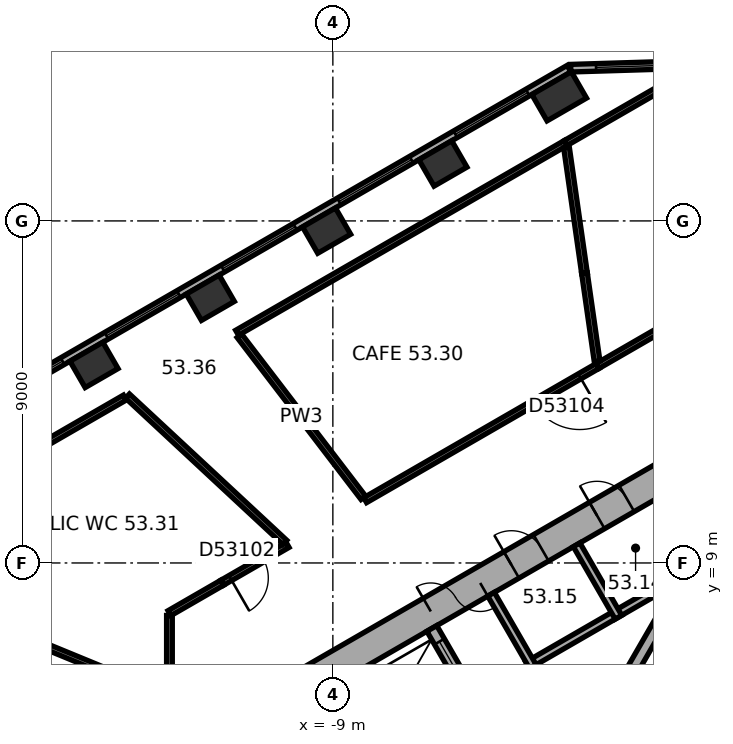
"""IFC4 building model, lengths in metres.
Left out: names, types, materials, properties, quantities, classifications, styles, units other than length and angle.
Written with IfcOpenShell. Run it as: python <this file> out.ifc"""

import sys

from ifc_helpers import new_model, si_unit, direction, frame, frame_2d, origin, origin_2d, place, context, subcontext, project, spatial, rectangle, extrude, element, fill, save


model = new_model("IFC4")
c1 = context("Model", 3, precision=1e-05, world=origin(), true_north=direction((0.0, 1.0)))
c2 = subcontext(c1, "Body", "Model", "MODEL_VIEW")
j1 = project(units=[si_unit("LENGTHUNIT", "METRE"), si_unit("PLANEANGLEUNIT", "RADIAN")], contexts=[c1])
p1 = place(None, origin())
s1 = spatial("IfcSite", under=j1, at=p1, CompositionType="ELEMENT")
p2 = place(p1, origin())
s2 = spatial("IfcBuilding", under=s1, at=p2, CompositionType="ELEMENT")
p3 = place(p2, frame((0.0, 0.0, 214.3)))
s3 = spatial("IfcBuildingStorey", under=s2, at=p3, CompositionType="ELEMENT", Elevation=214.3)
p4 = place(p3, frame((-3.044, 21.279, 0.0), z_axis=(0.0, 0.0, 1.0), x_axis=(-0.866025403784, -0.5, 0.0)))
e1 = element("IfcColumn", 1, at=p4, inside=s3, PredefinedType="COLUMN", context=c2, shape_type="SweptSolid", body=[
    extrude(rectangle(XDim=1.2, YDim=0.8, at=origin_2d()), origin(), (0.0, 0.0, 1.0), 7.4),
])
for number, where, z_axis, x_axis in (
    (2, (-6.104, 19.512, 0.0), (0.0, 0.0, 1.0), (-0.866, -0.5, 0.0)),
    (3, (-9.165, 17.745, 0.0), (0.0, 0.0, 1.0), (-0.866, -0.5, 0.0)),
    (4, (-12.225, 15.978, 0.0), (0.0, 0.0, 1.0), (-0.866, -0.5, 0.0)),
    (5, (-15.285, 14.211, 0.0), (0.0, 0.0, 1.0), (-0.866, -0.5, 0.0)),
):
    element("IfcColumn", number, at=place(p3, frame(where, z_axis=z_axis, x_axis=x_axis)), inside=s3, PredefinedType="COLUMN", context=c2, shape_type="SweptSolid", body=[
        extrude(rectangle(XDim=1.0, YDim=0.8, at=origin_2d()), origin(), (0.0, 0.0, 1.0), 7.4),
    ])
p5 = place(p3, frame((0.2, 11.547, 0.0), z_axis=(0.0, 0.0, 1.0), x_axis=(-0.866023897231, -0.500002609418, 0.0)))
e6 = element("IfcWall", 6, at=p5, inside=s3, PredefinedType="SHEAR", context=c2, shape_type="SweptSolid", body=[
    extrude(rectangle(XDim=11.894, YDim=0.8, at=frame_2d((5.947, 0.0))), origin(), (0.0, 0.0, 1.0), 7.4),
])
p6 = place(p5, frame((6.147, 0.0, 0.0)))
e7 = element("IfcOpeningElement", 7, at=p6, cuts=e6, PredefinedType="OPENING", context=c2, shape_type="SweptSolid", body=[
    extrude(rectangle(XDim=1.5, YDim=2.1, at=frame_2d((0.75, 1.05))), frame((0.0, 0.41, 0.0), z_axis=(0.0, -1.0, 0.0), x_axis=(1.0, 0.0, 0.0)), (0.0, 0.0, 1.0), 0.82),
])
p7 = place(p5, frame((1.697, 0.0, 0.0)))
e8 = element("IfcOpeningElement", 8, at=p7, cuts=e6, PredefinedType="OPENING", context=c2, shape_type="SweptSolid", body=[
    extrude(rectangle(XDim=0.9, YDim=2.1, at=frame_2d((0.45, 1.05))), frame((0.0, 0.41, 0.0), z_axis=(0.0, -1.0, 0.0), x_axis=(1.0, 0.0, 0.0)), (0.0, 0.0, 1.0), 0.82),
])
p8 = place(p5, frame((4.297, 0.0, 0.0)))
e9 = element("IfcOpeningElement", 9, at=p8, cuts=e6, PredefinedType="OPENING", context=c2, shape_type="SweptSolid", body=[
    extrude(rectangle(XDim=0.9, YDim=2.1, at=frame_2d((0.45, 1.05))), frame((0.0, 0.41, 0.0), z_axis=(0.0, -1.0, 0.0), x_axis=(1.0, 0.0, 0.0)), (0.0, 0.0, 1.0), 0.82),
])
p9 = place(p3, frame((1.389, 22.145, 0.0), z_axis=(0.0, 0.0, 1.0), x_axis=(-0.999534702881, -0.030502093955, 0.0)))
e10 = element("IfcWall", 10, at=p9, inside=s3, PredefinedType="STANDARD", context=c2, shape_type="SweptSolid", body=[
    extrude(rectangle(XDim=4.13, YDim=0.2, at=frame_2d((2.065, 0.0))), origin(), (0.0, 0.0, 1.0), 7.4),
])
p10 = place(p9, frame((0.665, 0.0, 0.8)))
e11 = element("IfcOpeningElement", 11, at=p10, cuts=e10, PredefinedType="OPENING", context=c2, shape_type="SweptSolid", body=[
    extrude(rectangle(XDim=2.8, YDim=4.2, at=frame_2d((1.4, 2.1))), frame((0.0, 0.11, 0.0), z_axis=(0.0, -1.0, 0.0), x_axis=(1.0, 0.0, 0.0)), (0.0, 0.0, 1.0), 0.22),
])
p11 = place(p3, frame((-2.786, 22.005, 0.0), z_axis=(0.0, 0.0, 1.0), x_axis=(-0.866026555358, -0.49999800541, 0.0)))
e12 = element("IfcWall", 12, at=p11, inside=s3, PredefinedType="STANDARD", context=c2, shape_type="SweptSolid", body=[
    extrude(rectangle(XDim=18.841, YDim=0.2, at=frame_2d((9.421, 0.0))), origin(), (0.0, 0.0, 1.0), 7.4),
])
p12 = place(p11, frame((1.254, 0.0, 0.8)))
e13 = element("IfcOpeningElement", 13, at=p12, cuts=e12, PredefinedType="OPENING", context=c2, shape_type="SweptSolid", body=[
    extrude(rectangle(XDim=2.2, YDim=4.2, at=frame_2d((1.1, 2.1))), frame((0.0, 0.11, 0.0), z_axis=(0.0, -1.0, 0.0), x_axis=(1.0, 0.0, 0.0)), (0.0, 0.0, 1.0), 0.22),
])
p13 = place(p11, frame((4.788, 0.0, 0.8)))
e14 = element("IfcOpeningElement", 14, at=p13, cuts=e12, PredefinedType="OPENING", context=c2, shape_type="SweptSolid", body=[
    extrude(rectangle(XDim=2.2, YDim=4.2, at=frame_2d((1.1, 2.1))), frame((0.0, 0.11, 0.0), z_axis=(0.0, -1.0, 0.0), x_axis=(1.0, 0.0, 0.0)), (0.0, 0.0, 1.0), 0.22),
])
p14 = place(p11, frame((8.321, 0.0, 0.8)))
e15 = element("IfcOpeningElement", 15, at=p14, cuts=e12, PredefinedType="OPENING", context=c2, shape_type="SweptSolid", body=[
    extrude(rectangle(XDim=2.2, YDim=4.2, at=frame_2d((1.1, 2.1))), frame((0.0, 0.11, 0.0), z_axis=(0.0, -1.0, 0.0), x_axis=(1.0, 0.0, 0.0)), (0.0, 0.0, 1.0), 0.22),
])
p15 = place(p11, frame((11.855, 0.0, 0.8)))
e16 = element("IfcOpeningElement", 16, at=p15, cuts=e12, PredefinedType="OPENING", context=c2, shape_type="SweptSolid", body=[
    extrude(rectangle(XDim=2.2, YDim=4.2, at=frame_2d((1.1, 2.1))), frame((0.0, 0.11, 0.0), z_axis=(0.0, -1.0, 0.0), x_axis=(1.0, 0.0, 0.0)), (0.0, 0.0, 1.0), 0.22),
])
p16 = place(p11, frame((15.389, 0.0, 0.8)))
e17 = element("IfcOpeningElement", 17, at=p16, cuts=e12, PredefinedType="OPENING", context=c2, shape_type="SweptSolid", body=[
    extrude(rectangle(XDim=2.2, YDim=4.2, at=frame_2d((1.1, 2.1))), frame((0.0, 0.11, 0.0), z_axis=(0.0, -1.0, 0.0), x_axis=(1.0, 0.0, 0.0)), (0.0, 0.0, 1.0), 0.22),
])
p17 = place(p3, frame((0.803, 9.009, 0.0), z_axis=(0.0, 0.0, 1.0), x_axis=(-0.866028230842, -0.499995103361, 0.0)))
e18 = element("IfcWall", 18, at=p17, inside=s3, PredefinedType="PARTITIONING", context=c2, shape_type="SweptSolid", body=[
    extrude(rectangle(XDim=5.4, YDim=0.2, at=frame_2d((2.7, 0.0))), origin(), (0.0, 0.0, 1.0), 7.12),
])
for number, where, z_axis, x_axis in (
    (19, (-1.485, 7.572, 0.0), (0.0, 0.0, 1.0), (-0.5, 0.866, 0.0)),
    (20, (-3.737, 6.272, 0.0), (0.0, 0.0, 1.0), (-0.5, 0.866, 0.0)),
):
    element("IfcWall", number, at=place(p3, frame(where, z_axis=z_axis, x_axis=x_axis)), inside=s3, PredefinedType="PARTITIONING", context=c2, shape_type="SweptSolid", body=[
        extrude(rectangle(XDim=2.2, YDim=0.2, at=frame_2d((1.1, 0.0))), origin(), (0.0, 0.0, 1.0), 7.12),
    ])
p18 = place(p3, frame((-2.216, 4.282, 0.0), z_axis=(0.0, 0.0, 1.0), x_axis=(0.499977259774, 0.866038532462, 0.0)))
e21 = element("IfcWall", 21, at=p18, inside=s3, PredefinedType="SHEAR", context=c2, shape_type="SweptSolid", body=[
    extrude(rectangle(XDim=4.7, YDim=0.3, at=frame_2d((2.35, 0.0))), origin(), (0.0, 0.0, 1.0), 7.12),
])
p19 = place(p3, frame((-5.295, 5.372, 0.0), z_axis=(0.0, 0.0, 1.0), x_axis=(-0.500077893725, 0.86598042715, 0.0)))
e22 = element("IfcWall", 22, at=p19, inside=s3, PredefinedType="SHEAR", context=c2, shape_type="SweptSolid", body=[
    extrude(rectangle(XDim=2.2, YDim=0.3, at=frame_2d((1.1, 0.0))), origin(), (0.0, 0.0, 1.0), 7.12),
])
p20 = place(p19, frame((0.7, 0.0, 0.0)))
e23 = element("IfcOpeningElement", 23, at=p20, cuts=e22, PredefinedType="OPENING", context=c2, shape_type="SweptSolid", body=[
    extrude(rectangle(XDim=1.1, YDim=2.1, at=frame_2d((0.55, 1.05))), frame((0.0, 0.16, 0.0), z_axis=(0.0, -1.0, 0.0), x_axis=(1.0, 0.0, 0.0)), (0.0, 0.0, 1.0), 0.32),
])
p21 = place(p3, frame((-13.411, 5.514, 0.0), z_axis=(0.0, 0.0, 1.0), x_axis=(-0.924874082037, 0.380273496809, 0.0)))
e24 = element("IfcWall", 24, at=p21, inside=s3, PredefinedType="PARTITIONING", context=c2, shape_type="SweptSolid", body=[
    extrude(rectangle(XDim=5.827, YDim=0.15, at=frame_2d((2.914, 0.0))), origin(), (0.0, 0.0, 1.0), 6.57),
])
p22 = place(p3, frame((-13.3, 7.619, 0.0), z_axis=(0.0, 0.0, 1.0), x_axis=(0.0, -1.0, 0.0)))
e25 = element("IfcWall", 25, at=p22, inside=s3, PredefinedType="PARTITIONING", context=c2, shape_type="SweptSolid", body=[
    extrude(rectangle(XDim=2.151, YDim=0.15, at=frame_2d((1.075, 0.0))), origin(), (0.0, 0.0, 1.0), 7.12),
])
p23 = place(p3, frame((-11.915, 8.479, 0.0), z_axis=(0.0, 0.0, 1.0), x_axis=(-0.86604576824, -0.499964726069, 0.0)))
e26 = element("IfcWall", 26, at=p23, inside=s3, PredefinedType="PARTITIONING", context=c2, shape_type="SweptSolid", body=[
    extrude(rectangle(XDim=1.599, YDim=0.15, at=frame_2d((0.8, 0.0))), origin(), (0.0, 0.0, 1.0), 7.12),
])
p24 = place(p3, frame((-11.915, 8.479, 0.0), z_axis=(0.0, 0.0, 1.0), x_axis=(0.866108031567, 0.499856857165, 0.0)))
e27 = element("IfcWall", 27, at=p24, inside=s3, PredefinedType="PARTITIONING", context=c2, shape_type="SweptSolid", body=[
    extrude(rectangle(XDim=1.992, YDim=0.15, at=frame_2d((0.996, 0.0))), origin(), (0.0, 0.0, 1.0), 7.12),
])
p25 = place(p24, frame((0.25, 0.0, 0.0)))
e28 = element("IfcOpeningElement", 28, at=p25, cuts=e27, PredefinedType="OPENING", context=c2, shape_type="SweptSolid", body=[
    extrude(rectangle(XDim=1.0, YDim=2.1, at=frame_2d((0.5, 1.05))), frame((0.0, 0.085, 0.0), z_axis=(0.0, -1.0, 0.0), x_axis=(1.0, 0.0, 0.0)), (0.0, 0.0, 1.0), 0.17),
])
p26 = place(p3, frame((-8.199, 10.716, 0.0), z_axis=(0.0, 0.0, 1.0), x_axis=(-0.607666232271, 0.794192514544, 0.0)))
e29 = element("IfcWall", 29, at=p26, inside=s3, PredefinedType="PARTITIONING", context=c2, shape_type="SweptSolid", body=[
    extrude(rectangle(XDim=5.366, YDim=0.15, at=frame_2d((2.683, 0.0))), origin(), (0.0, 0.0, 1.0), 7.12),
])
p27 = place(p3, frame((-18.748, 10.884, 0.0), z_axis=(0.0, 0.0, 1.0), x_axis=(0.866021674193, 0.500006459787, 0.0)))
e30 = element("IfcWall", 30, at=p27, inside=s3, PredefinedType="PARTITIONING", context=c2, shape_type="SweptSolid", body=[
    extrude(rectangle(XDim=4.936, YDim=0.15, at=frame_2d((2.468, 0.0))), origin(), (0.0, 0.0, 1.0), 7.12),
])
p28 = place(p3, frame((-14.404, 13.392, 0.0), z_axis=(0.0, 0.0, 1.0), x_axis=(0.73235196953, -0.680926275543, 0.0)))
e31 = element("IfcWall", 31, at=p28, inside=s3, PredefinedType="PARTITIONING", context=c2, shape_type="SweptSolid", body=[
    extrude(rectangle(XDim=5.654, YDim=0.15, at=frame_2d((2.827, 0.0))), origin(), (0.0, 0.0, 1.0), 6.57),
])
p29 = place(p3, frame((-2.03, 14.186, 0.0), z_axis=(0.0, 0.0, 1.0), x_axis=(-0.866034287694, -0.499984612302, 0.0)))
e32 = element("IfcWall", 32, at=p29, inside=s3, PredefinedType="PARTITIONING", context=c2, shape_type="SweptSolid", body=[
    extrude(rectangle(XDim=7.067, YDim=0.15, at=frame_2d((3.534, 0.0))), origin(), (0.0, 0.0, 1.0), 7.12),
])
p30 = place(p29, frame((0.55, 0.0, 0.0)))
e33 = element("IfcOpeningElement", 33, at=p30, cuts=e32, PredefinedType="OPENING", context=c2, shape_type="SweptSolid", body=[
    extrude(rectangle(XDim=1.4, YDim=2.4, at=frame_2d((0.7, 1.2))), frame((0.0, 0.085, 0.0), z_axis=(0.0, -1.0, 0.0), x_axis=(1.0, 0.0, 0.0)), (0.0, 0.0, 1.0), 0.17),
])
p31 = place(p3, frame((-11.521, 15.057, 0.0), z_axis=(0.0, 0.0, 1.0), x_axis=(0.866020763381, 0.500008037328, 0.0)))
e34 = element("IfcWall", 34, at=p31, inside=s3, PredefinedType="PARTITIONING", context=c2, shape_type="SweptSolid", body=[
    extrude(rectangle(XDim=9.99, YDim=0.15, at=frame_2d((4.995, 0.0))), origin(), (0.0, 0.0, 1.0), 7.12),
])
p32 = place(p3, frame((0.0, 15.357, 0.0), z_axis=(0.0, 0.0, 1.0), x_axis=(-0.866003425329, -0.50003806587, 0.0)))
e35 = element("IfcWall", 35, at=p32, inside=s3, PredefinedType="PARTITIONING", context=c2, shape_type="SweptSolid", body=[
    extrude(rectangle(XDim=2.344, YDim=0.15, at=frame_2d((1.172, 0.0))), origin(), (0.0, 0.0, 1.0), 7.12),
])
p33 = place(p3, frame((-2.378, 16.623, 0.0), z_axis=(0.0, 0.0, 1.0), x_axis=(0.141669455773, -0.989914019146, 0.0)))
e36 = element("IfcWall", 36, at=p33, inside=s3, PredefinedType="PARTITIONING", context=c2, shape_type="SweptSolid", body=[
    extrude(rectangle(XDim=2.342, YDim=0.15, at=frame_2d((1.171, 0.0))), origin(), (0.0, 0.0, 1.0), 6.57),
])
p34 = place(p3, frame((-2.378, 16.623, 0.0), z_axis=(0.0, 0.0, 1.0), x_axis=(-0.141625761538, 0.98992027137, 0.0)))
e37 = element("IfcWall", 37, at=p34, inside=s3, PredefinedType="PARTITIONING", context=c2, shape_type="SweptSolid", body=[
    extrude(rectangle(XDim=3.344, YDim=0.15, at=frame_2d((1.672, 0.0))), origin(), (0.0, 0.0, 1.0), 6.57),
])
p35 = place(p3, frame((-2.869, 20.052, 0.0), z_axis=(0.0, 0.0, 1.0), x_axis=(0.866007628942, 0.500030785667, 0.0)))
e38 = element("IfcWall", 38, at=p35, inside=s3, PredefinedType="PARTITIONING", context=c2, shape_type="SweptSolid", body=[
    extrude(rectangle(XDim=3.313, YDim=0.15, at=frame_2d((1.656, 0.0))), origin(), (0.0, 0.0, 1.0), 7.12),
])
p36 = place(p10, origin())
e39 = element("IfcWindow", 39, at=p36, inside=s3, PartitioningType="SINGLE_PANEL", PredefinedType="WINDOW", context=c2, shape_type="SweptSolid", body=[
    extrude(rectangle(XDim=2.8, YDim=4.2, at=frame_2d((1.4, 2.1))), frame((0.0, 0.03, 0.0), z_axis=(0.0, -1.0, 0.0), x_axis=(1.0, 0.0, 0.0)), (0.0, 0.0, 1.0), 0.06),
])
fill(e11, e39)
p37 = place(p12, origin())
e40 = element("IfcWindow", 40, at=p37, inside=s3, PartitioningType="SINGLE_PANEL", PredefinedType="WINDOW", context=c2, shape_type="SweptSolid", body=[
    extrude(rectangle(XDim=2.2, YDim=4.2, at=frame_2d((1.1, 2.1))), frame((0.0, 0.03, 0.0), z_axis=(0.0, -1.0, 0.0), x_axis=(1.0, 0.0, 0.0)), (0.0, 0.0, 1.0), 0.06),
])
fill(e13, e40)
p38 = place(p13, origin())
e41 = element("IfcWindow", 41, at=p38, inside=s3, PartitioningType="SINGLE_PANEL", PredefinedType="WINDOW", context=c2, shape_type="SweptSolid", body=[
    extrude(rectangle(XDim=2.2, YDim=4.2, at=frame_2d((1.1, 2.1))), frame((0.0, 0.03, 0.0), z_axis=(0.0, -1.0, 0.0), x_axis=(1.0, 0.0, 0.0)), (0.0, 0.0, 1.0), 0.06),
])
fill(e14, e41)
p39 = place(p14, origin())
e42 = element("IfcWindow", 42, at=p39, inside=s3, PartitioningType="SINGLE_PANEL", PredefinedType="WINDOW", context=c2, shape_type="SweptSolid", body=[
    extrude(rectangle(XDim=2.2, YDim=4.2, at=frame_2d((1.1, 2.1))), frame((0.0, 0.03, 0.0), z_axis=(0.0, -1.0, 0.0), x_axis=(1.0, 0.0, 0.0)), (0.0, 0.0, 1.0), 0.06),
])
fill(e15, e42)
p40 = place(p15, origin())
e43 = element("IfcWindow", 43, at=p40, inside=s3, PartitioningType="SINGLE_PANEL", PredefinedType="WINDOW", context=c2, shape_type="SweptSolid", body=[
    extrude(rectangle(XDim=2.2, YDim=4.2, at=frame_2d((1.1, 2.1))), frame((0.0, 0.03, 0.0), z_axis=(0.0, -1.0, 0.0), x_axis=(1.0, 0.0, 0.0)), (0.0, 0.0, 1.0), 0.06),
])
fill(e16, e43)
p41 = place(p16, origin())
e44 = element("IfcWindow", 44, at=p41, inside=s3, PartitioningType="SINGLE_PANEL", PredefinedType="WINDOW", context=c2, shape_type="SweptSolid", body=[
    extrude(rectangle(XDim=2.2, YDim=4.2, at=frame_2d((1.1, 2.1))), frame((0.0, 0.03, 0.0), z_axis=(0.0, -1.0, 0.0), x_axis=(1.0, 0.0, 0.0)), (0.0, 0.0, 1.0), 0.06),
])
fill(e17, e44)
p42 = place(p6, origin())
e45 = element("IfcDoor", 45, at=p42, inside=s3, OperationType="DOUBLE_DOOR_SINGLE_SWING", PredefinedType="DOOR", context=c2, shape_type="SweptSolid", body=[
    extrude(rectangle(XDim=1.5, YDim=2.1, at=frame_2d((0.75, 1.05))), frame((0.0, 0.025, 0.0), z_axis=(0.0, -1.0, 0.0), x_axis=(1.0, 0.0, 0.0)), (0.0, 0.0, 1.0), 0.05),
])
fill(e7, e45)
p43 = place(p7, origin())
e46 = element("IfcDoor", 46, at=p43, inside=s3, OperationType="SINGLE_SWING_LEFT", PredefinedType="DOOR", context=c2, shape_type="SweptSolid", body=[
    extrude(rectangle(XDim=0.9, YDim=2.1, at=frame_2d((0.45, 1.05))), frame((0.0, 0.025, 0.0), z_axis=(0.0, -1.0, 0.0), x_axis=(1.0, 0.0, 0.0)), (0.0, 0.0, 1.0), 0.05),
])
fill(e8, e46)
p44 = place(p8, origin())
e47 = element("IfcDoor", 47, at=p44, inside=s3, OperationType="SINGLE_SWING_LEFT", PredefinedType="DOOR", context=c2, shape_type="SweptSolid", body=[
    extrude(rectangle(XDim=0.9, YDim=2.1, at=frame_2d((0.45, 1.05))), frame((0.0, 0.025, 0.0), z_axis=(0.0, -1.0, 0.0), x_axis=(1.0, 0.0, 0.0)), (0.0, 0.0, 1.0), 0.05),
])
fill(e9, e47)
p45 = place(p20, origin())
e48 = element("IfcDoor", 48, at=p45, inside=s3, OperationType="DOUBLE_DOOR_SLIDING", PredefinedType="DOOR", context=c2, shape_type="SweptSolid", body=[
    extrude(rectangle(XDim=1.1, YDim=2.1, at=frame_2d((0.55, 1.05))), frame((0.0, 0.025, 0.0), z_axis=(0.0, -1.0, 0.0), x_axis=(1.0, 0.0, 0.0)), (0.0, 0.0, 1.0), 0.05),
])
fill(e23, e48)
p46 = place(p25, origin())
e49 = element("IfcDoor", 49, at=p46, inside=s3, OperationType="SINGLE_SWING_LEFT", PredefinedType="DOOR", context=c2, shape_type="SweptSolid", body=[
    extrude(rectangle(XDim=1.0, YDim=2.1, at=frame_2d((0.5, 1.05))), frame((0.0, 0.025, 0.0), z_axis=(0.0, -1.0, 0.0), x_axis=(1.0, 0.0, 0.0)), (0.0, 0.0, 1.0), 0.05),
])
fill(e28, e49)
p47 = place(p30, origin())
e50 = element("IfcDoor", 50, at=p47, inside=s3, OperationType="SINGLE_SWING_LEFT", PredefinedType="DOOR", context=c2, shape_type="SweptSolid", body=[
    extrude(rectangle(XDim=1.4, YDim=2.4, at=frame_2d((0.7, 1.2))), frame((0.0, 0.025, 0.0), z_axis=(0.0, -1.0, 0.0), x_axis=(1.0, 0.0, 0.0)), (0.0, 0.0, 1.0), 0.05),
])
fill(e33, e50)
save(model, sys.argv[1])
